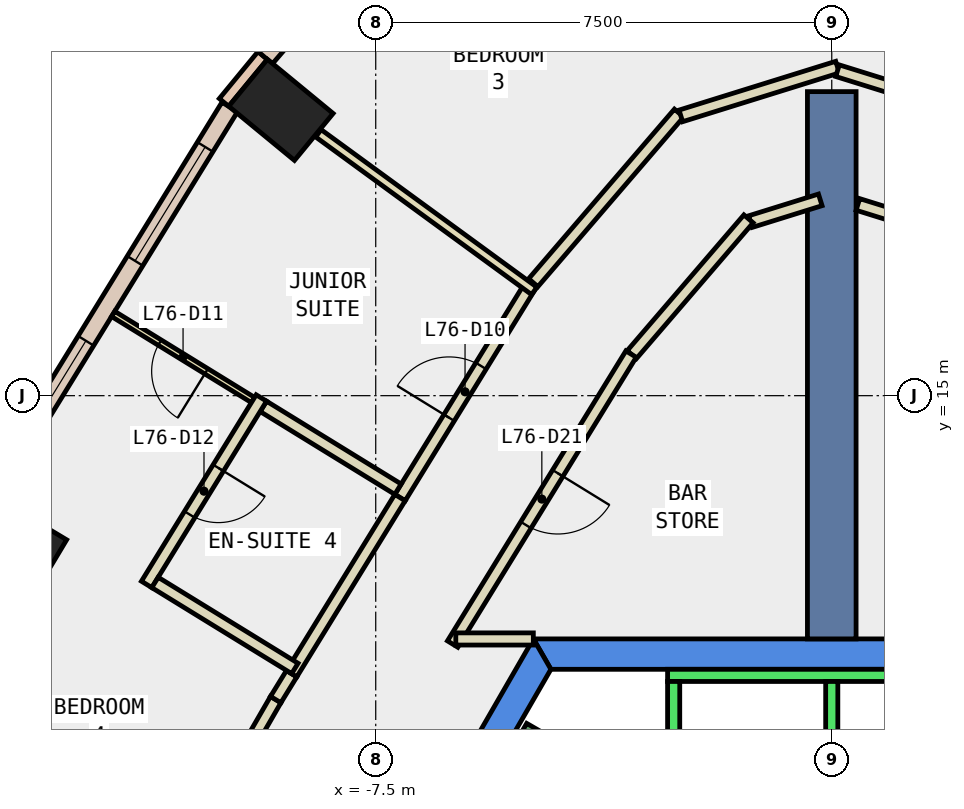
"""IFC4 building model, lengths in metres.
Left out: names, types, materials, properties, quantities, classifications, styles, units other than length and angle.
Written with IfcOpenShell. Run it as: python <this file> out.ifc"""

import sys

from ifc_helpers import new_model, si_unit, direction, frame, frame_2d, origin, origin_2d, place, context, subcontext, project, spatial, polyline, rectangle, outline, extrude, element, fill, save


model = new_model("IFC4")
c1 = context("Model", 3, precision=1e-05, world=origin(), true_north=direction((0.0, 1.0)))
c2 = subcontext(c1, "Body", "Model", "MODEL_VIEW")
j1 = project(units=[si_unit("LENGTHUNIT", "METRE"), si_unit("PLANEANGLEUNIT", "RADIAN")], contexts=[c1])
p1 = place(None, origin())
s1 = spatial("IfcSite", under=j1, at=p1, CompositionType="ELEMENT")
p2 = place(p1, origin())
s2 = spatial("IfcBuilding", under=s1, at=p2, CompositionType="ELEMENT")
p3 = place(p2, frame((0.0, 0.0, 322.4)))
s3 = spatial("IfcBuildingStorey", under=s2, at=p3, CompositionType="ELEMENT", Elevation=322.4)
for number, where, z_axis, x_axis in (
    (1, (-9.059, 19.7, -0.34), (0.0, 0.0, 1.0), (0.636, 0.772, 0.0)),
    (2, (-13.441, 12.561, -0.34), (0.0, 0.0, 1.0), (0.514, 0.858, 0.0)),
):
    element("IfcColumn", number, at=place(p3, frame(where, z_axis=z_axis, x_axis=x_axis)), inside=s3, PredefinedType="COLUMN", context=c2, shape_type="SweptSolid", body=[
        extrude(rectangle(XDim=1.0, YDim=1.4, at=origin_2d()), origin(), (0.0, 0.0, 1.0), 3.34),
    ])
p4 = place(p3, frame((0.0, 0.0, -0.34)))
e3 = element("IfcWall", 3, at=p4, inside=s3, PredefinedType="SHEAR", context=c2, shape_type="SweptSolid", body=[
    extrude(outline(polyline([(4.907, 11.0), (-4.907, 11.0), (-4.619, 10.5), (4.619, 10.5), (4.907, 11.0)])), origin(), (0.0, 0.0, 1.0), 3.34),
])
p5 = place(p3, frame((0.0, 0.0, -0.34)))
e4 = element("IfcWall", 4, at=p5, inside=s3, PredefinedType="SHEAR", context=c2, shape_type="SweptSolid", body=[
    extrude(outline(polyline([(-9.236, 3.502), (-8.803, 3.253), (-4.619, 10.5), (-4.907, 11.0), (-9.236, 3.502)])), origin(), (0.0, 0.0, 1.0), 3.34),
])
p6 = place(p3, frame((0.0, 11.0, -0.34), z_axis=(0.0, 0.0, 1.0), x_axis=(0.0, 1.0, 0.0)))
e5 = element("IfcWall", 5, at=p6, inside=s3, PredefinedType="SHEAR", context=c2, shape_type="SweptSolid", body=[
    extrude(rectangle(XDim=9.0, YDim=0.8, at=frame_2d((4.5, 0.0))), origin(), (0.0, 0.0, 1.0), 3.34),
])
p7 = place(p3, frame((-9.359, 20.594, 0.0), z_axis=(0.0, 0.0, 1.0), x_axis=(-0.635998056672, -0.771690658172, 0.0)))
e6 = element("IfcWall", 6, at=p7, inside=s3, PredefinedType="STANDARD", context=c2, shape_type="SweptSolid", body=[
    extrude(rectangle(XDim=1.0, YDim=0.2, at=frame_2d((0.5, 0.0))), origin(), (0.0, 0.0, 1.0), 3.0),
])
p8 = place(p3, frame((-6.219, 24.156, 0.0), z_axis=(0.0, 0.0, 1.0), x_axis=(-0.651684474108, -0.758490175419, 0.0)))
e7 = element("IfcWall", 7, at=p8, inside=s3, PredefinedType="STANDARD", context=c2, shape_type="SweptSolid", body=[
    extrude(rectangle(XDim=4.748, YDim=0.3, at=frame_2d((2.374, 0.0))), origin(), (0.0, 0.0, 1.0), 3.0),
])
p9 = place(p8, frame((1.674, 0.0, 0.9)))
e8 = element("IfcOpeningElement", 8, at=p9, cuts=e7, PredefinedType="OPENING", context=c2, shape_type="SweptSolid", body=[
    extrude(rectangle(XDim=1.4, YDim=2.0, at=frame_2d((0.7, 1.0))), frame((0.0, 0.16, 0.0), z_axis=(0.0, -1.0, 0.0), x_axis=(1.0, 0.0, 0.0)), (0.0, 0.0, 1.0), 0.32),
])
p10 = place(p3, frame((-9.901, 19.747, 0.0), z_axis=(0.0, 0.0, 1.0), x_axis=(-0.524004608874, -0.851715427757, 0.0)))
e9 = element("IfcWall", 9, at=p10, inside=s3, PredefinedType="STANDARD", context=c2, shape_type="SweptSolid", body=[
    extrude(rectangle(XDim=7.485, YDim=0.3, at=frame_2d((3.742, 0.0))), origin(), (0.0, 0.0, 1.0), 3.0),
])
p11 = place(p10, frame((0.771, 0.0, 0.9)))
e10 = element("IfcOpeningElement", 10, at=p11, cuts=e9, PredefinedType="OPENING", context=c2, shape_type="SweptSolid", body=[
    extrude(rectangle(XDim=2.2, YDim=2.0, at=frame_2d((1.1, 1.0))), frame((0.0, 0.16, 0.0), z_axis=(0.0, -1.0, 0.0), x_axis=(1.0, 0.0, 0.0)), (0.0, 0.0, 1.0), 0.32),
])
p12 = place(p10, frame((4.514, 0.0, 0.9)))
e11 = element("IfcOpeningElement", 11, at=p12, cuts=e9, PredefinedType="OPENING", context=c2, shape_type="SweptSolid", body=[
    extrude(rectangle(XDim=2.2, YDim=2.0, at=frame_2d((1.1, 1.0))), frame((0.0, 0.16, 0.0), z_axis=(0.0, -1.0, 0.0), x_axis=(1.0, 0.0, 0.0)), (0.0, 0.0, 1.0), 0.32),
])
p13 = place(p3, frame((1.339, 17.862, 0.0), z_axis=(0.0, 0.0, 1.0), x_axis=(-0.954826063502, 0.297165254457, 0.0)))
e12 = element("IfcWall", 12, at=p13, inside=s3, PredefinedType="PARTITIONING", context=c2, shape_type="SweptSolid", body=[
    extrude(rectangle(XDim=0.952, YDim=0.2, at=frame_2d((0.476, 0.0))), origin(), (0.0, 0.0, 1.0), 3.0),
])
p14 = place(p3, frame((-0.189, 18.22, 0.0), z_axis=(0.0, 0.0, 1.0), x_axis=(-0.954836332451, -0.297132257137, 0.0)))
e13 = element("IfcWall", 13, at=p14, inside=s3, PredefinedType="PARTITIONING", context=c2, shape_type="SweptSolid", body=[
    extrude(rectangle(XDim=1.205, YDim=0.2, at=frame_2d((0.602, 0.0))), origin(), (0.0, 0.0, 1.0), 3.0),
])
p15 = place(p3, frame((-1.369, 17.908, 0.0), z_axis=(0.0, 0.0, 1.0), x_axis=(-0.651848676423, -0.758349064116, 0.0)))
e14 = element("IfcWall", 14, at=p15, inside=s3, PredefinedType="PARTITIONING", context=c2, shape_type="SweptSolid", body=[
    extrude(rectangle(XDim=2.946, YDim=0.2, at=frame_2d((1.473, 0.0))), origin(), (0.0, 0.0, 1.0), 3.0),
])
p16 = place(p3, frame((-3.301, 15.684, 0.0), z_axis=(0.0, 0.0, 1.0), x_axis=(-0.524004979532, -0.851715199715, 0.0)))
e15 = element("IfcWall", 15, at=p16, inside=s3, PredefinedType="PARTITIONING", context=c2, shape_type="SweptSolid", body=[
    extrude(rectangle(XDim=5.599, YDim=0.2, at=frame_2d((2.8, 0.0))), origin(), (0.0, 0.0, 1.0), 3.0),
])
p17 = place(p16, frame((2.3, 0.0, 0.0)))
e16 = element("IfcOpeningElement", 16, at=p17, cuts=e15, PredefinedType="OPENING", context=c2, shape_type="SweptSolid", body=[
    extrude(rectangle(XDim=1.0, YDim=2.1, at=frame_2d((0.5, 1.05))), frame((0.0, 0.11, 0.0), z_axis=(0.0, -1.0, 0.0), x_axis=(1.0, 0.0, 0.0)), (0.0, 0.0, 1.0), 0.22),
])
p18 = place(p3, frame((-6.183, 10.999, 0.0), z_axis=(0.0, 0.0, 1.0), x_axis=(1.0, 0.0, 0.0)))
e17 = element("IfcWall", 17, at=p18, inside=s3, PredefinedType="PARTITIONING", context=c2, shape_type="SweptSolid", body=[
    extrude(rectangle(XDim=1.275, YDim=0.2, at=frame_2d((0.638, 0.0))), origin(), (0.0, 0.0, 1.0), 3.0),
])
p19 = place(p3, frame((-4.909, 16.858, 0.0), z_axis=(0.0, 0.0, 1.0), x_axis=(0.651785835936, 0.758403074937, 0.0)))
e18 = element("IfcWall", 18, at=p19, inside=s3, PredefinedType="PARTITIONING", context=c2, shape_type="SweptSolid", body=[
    extrude(rectangle(XDim=3.677, YDim=0.2, at=frame_2d((1.839, 0.0))), origin(), (0.0, 0.0, 1.0), 3.0),
])
p20 = place(p3, frame((-2.482, 19.601, 0.0), z_axis=(0.0, 0.0, 1.0), x_axis=(0.95482540871, 0.297167358372, 0.0)))
e19 = element("IfcWall", 19, at=p20, inside=s3, PredefinedType="PARTITIONING", context=c2, shape_type="SweptSolid", body=[
    extrude(rectangle(XDim=2.699, YDim=0.2, at=frame_2d((1.349, 0.0))), origin(), (0.0, 0.0, 1.0), 3.0),
])
p21 = place(p3, frame((0.095, 20.344, 0.0), z_axis=(0.0, 0.0, 1.0), x_axis=(0.954837867825, -0.297127323158, 0.0)))
e20 = element("IfcWall", 20, at=p21, inside=s3, PredefinedType="PARTITIONING", context=c2, shape_type="SweptSolid", body=[
    extrude(rectangle(XDim=2.605, YDim=0.2, at=frame_2d((1.302, 0.0))), origin(), (0.0, 0.0, 1.0), 3.0),
])
p22 = place(p3, frame((-7.101, 13.324, 0.0), z_axis=(0.0, 0.0, 1.0), x_axis=(0.52395735307, 0.851744499344, 0.0)))
e21 = element("IfcWall", 21, at=p22, inside=s3, PredefinedType="PARTITIONING", context=c2, shape_type="SweptSolid", body=[
    extrude(rectangle(XDim=4.084, YDim=0.2, at=frame_2d((2.042, 0.0))), origin(), (0.0, 0.0, 1.0), 3.0),
])
p23 = place(p22, frame((1.542, 0.0, 0.0)))
e22 = element("IfcOpeningElement", 22, at=p23, cuts=e21, PredefinedType="OPENING", context=c2, shape_type="SweptSolid", body=[
    extrude(rectangle(XDim=1.0, YDim=2.1, at=frame_2d((0.5, 1.05))), frame((0.0, 0.11, 0.0), z_axis=(0.0, -1.0, 0.0), x_axis=(1.0, 0.0, 0.0)), (0.0, 0.0, 1.0), 0.22),
])
p24 = place(p3, frame((-11.153, 6.525, 0.0), z_axis=(0.0, 0.0, 1.0), x_axis=(0.500108414701, 0.865962801479, 0.0)))
e23 = element("IfcWall", 23, at=p24, inside=s3, PredefinedType="PARTITIONING", context=c2, shape_type="SweptSolid", body=[
    extrude(rectangle(XDim=4.015, YDim=0.2, at=frame_2d((2.008, 0.0))), origin(), (0.0, 0.0, 1.0), 3.0),
])
p25 = place(p3, frame((-9.145, 10.002, 0.0), z_axis=(0.0, 0.0, 1.0), x_axis=(0.523797791684, 0.851842634192, 0.0)))
e24 = element("IfcWall", 24, at=p25, inside=s3, PredefinedType="PARTITIONING", context=c2, shape_type="SweptSolid", body=[
    extrude(rectangle(XDim=0.5, YDim=0.2, at=frame_2d((0.25, 0.0))), origin(), (0.0, 0.0, 1.0), 3.0),
])
p26 = place(p3, frame((-8.883, 10.428, 0.0), z_axis=(0.0, 0.0, 1.0), x_axis=(0.524061371587, 0.851680502777, 0.0)))
e25 = element("IfcWall", 25, at=p26, inside=s3, PredefinedType="PARTITIONING", context=c2, shape_type="SweptSolid", body=[
    extrude(rectangle(XDim=3.4, YDim=0.2, at=frame_2d((1.7, 0.0))), origin(), (0.0, 0.0, 1.0), 3.0),
])
p27 = place(p3, frame((-4.893, 16.723, 0.0), z_axis=(0.0, 0.0, 1.0), x_axis=(-0.807632235509, 0.589686503294, 0.0)))
e26 = element("IfcWall", 26, at=p27, inside=s3, PredefinedType="PARTITIONING", context=c2, shape_type="SweptSolid", body=[
    extrude(rectangle(XDim=4.396, YDim=0.15, at=frame_2d((2.198, 0.0))), origin(), (0.0, 0.0, 1.0), 3.0),
])
p28 = place(p3, frame((-9.519, 14.929, 0.0), z_axis=(0.0, 0.0, 1.0), x_axis=(-0.851621054013, 0.524157972715, 0.0)))
e27 = element("IfcWall", 27, at=p28, inside=s3, PredefinedType="PARTITIONING", context=c2, shape_type="SweptSolid", body=[
    extrude(rectangle(XDim=2.7, YDim=0.1, at=frame_2d((1.35, 0.0))), origin(), (0.0, 0.0, 1.0), 3.0),
])
p29 = place(p28, frame((0.9, 0.0, 0.0)))
e28 = element("IfcOpeningElement", 28, at=p29, cuts=e27, PredefinedType="OPENING", context=c2, shape_type="SweptSolid", body=[
    extrude(rectangle(XDim=0.9, YDim=2.1, at=frame_2d((0.45, 1.05))), frame((0.0, 0.06, 0.0), z_axis=(0.0, -1.0, 0.0), x_axis=(1.0, 0.0, 0.0)), (0.0, 0.0, 1.0), 0.12),
])
p30 = place(p3, frame((-7.134, 13.462, 0.0), z_axis=(0.0, 0.0, 1.0), x_axis=(-0.851713135301, 0.524008335007, 0.0)))
e29 = element("IfcWall", 29, at=p30, inside=s3, PredefinedType="PARTITIONING", context=c2, shape_type="SweptSolid", body=[
    extrude(rectangle(XDim=2.599, YDim=0.2, at=frame_2d((1.3, 0.0))), origin(), (0.0, 0.0, 1.0), 3.0),
])
p31 = place(p3, frame((-9.381, 14.962, 0.0), z_axis=(0.0, 0.0, 1.0), x_axis=(-0.524146612914, -0.851628045669, 0.0)))
e30 = element("IfcWall", 30, at=p31, inside=s3, PredefinedType="PARTITIONING", context=c2, shape_type="SweptSolid", body=[
    extrude(rectangle(XDim=3.6, YDim=0.2, at=frame_2d((1.8, 0.0))), origin(), (0.0, 0.0, 1.0), 3.0),
])
p32 = place(p31, frame((1.35, 0.0, 0.0)))
e31 = element("IfcOpeningElement", 31, at=p32, cuts=e30, PredefinedType="OPENING", context=c2, shape_type="SweptSolid", body=[
    extrude(rectangle(XDim=0.9, YDim=2.1, at=frame_2d((0.45, 1.05))), frame((0.0, 0.11, 0.0), z_axis=(0.0, -1.0, 0.0), x_axis=(1.0, 0.0, 0.0)), (0.0, 0.0, 1.0), 0.22),
])
p33 = place(p3, frame((-11.13, 11.928, 0.0), z_axis=(0.0, 0.0, 1.0), x_axis=(0.851856970107, -0.523774476737, 0.0)))
e32 = element("IfcWall", 32, at=p33, inside=s3, PredefinedType="PARTITIONING", context=c2, shape_type="SweptSolid", body=[
    extrude(rectangle(XDim=2.7, YDim=0.2, at=frame_2d((1.35, 0.0))), origin(), (0.0, 0.0, 1.0), 3.0),
])
p34 = place(p3, frame((2.7, 10.4, 0.0), z_axis=(0.0, 0.0, 1.0), x_axis=(-1.0, 0.0, 0.0)))
e33 = element("IfcWall", 33, at=p34, inside=s3, PredefinedType="STANDARD", context=c2, shape_type="SweptSolid", body=[
    extrude(rectangle(XDim=5.4, YDim=0.2, at=frame_2d((2.7, 0.0))), origin(), (0.0, 0.0, 1.0), 3.0),
])
for number, where, z_axis, x_axis in (
    (34, (0.0, 7.9, 0.0), (0.0, 0.0, 1.0), (0.0, 1.0, 0.0)),
    (35, (-2.6, 7.9, 0.0), (0.0, 0.0, 1.0), (0.0, 1.0, 0.0)),
):
    element("IfcWall", number, at=place(p3, frame(where, z_axis=z_axis, x_axis=x_axis)), inside=s3, PredefinedType="STANDARD", context=c2, shape_type="SweptSolid", body=[
        extrude(rectangle(XDim=2.4, YDim=0.2, at=frame_2d((1.2, 0.0))), origin(), (0.0, 0.0, 1.0), 3.0),
    ])
p35 = place(p3, frame((-1.256, 7.324, 0.0), z_axis=(0.0, 0.0, 1.0), x_axis=(-0.866046073146, 0.499964197906, 0.0)))
e36 = element("IfcWall", 36, at=p35, inside=s3, PredefinedType="STANDARD", context=c2, shape_type="SweptSolid", body=[
    extrude(rectangle(XDim=4.4, YDim=0.2, at=frame_2d((2.2, 0.0))), origin(), (0.0, 0.0, 1.0), 3.0),
])
p36 = place(p35, frame((2.4, 0.0, 0.0)))
e37 = element("IfcOpeningElement", 37, at=p36, cuts=e36, PredefinedType="OPENING", context=c2, shape_type="SweptSolid", body=[
    extrude(rectangle(XDim=1.1, YDim=2.2, at=frame_2d((0.55, 1.1))), frame((0.0, 0.11, 0.0), z_axis=(0.0, -1.0, 0.0), x_axis=(1.0, 0.0, 0.0)), (0.0, 0.0, 1.0), 0.22),
])
p37 = place(p11, origin())
e38 = element("IfcWindow", 38, at=p37, inside=s3, PartitioningType="SINGLE_PANEL", PredefinedType="WINDOW", context=c2, shape_type="SweptSolid", body=[
    extrude(rectangle(XDim=2.2, YDim=2.0, at=frame_2d((1.1, 1.0))), frame((0.0, 0.03, 0.0), z_axis=(0.0, -1.0, 0.0), x_axis=(1.0, 0.0, 0.0)), (0.0, 0.0, 1.0), 0.06),
])
fill(e10, e38)
p38 = place(p12, origin())
e39 = element("IfcWindow", 39, at=p38, inside=s3, PartitioningType="SINGLE_PANEL", PredefinedType="WINDOW", context=c2, shape_type="SweptSolid", body=[
    extrude(rectangle(XDim=2.2, YDim=2.0, at=frame_2d((1.1, 1.0))), frame((0.0, 0.03, 0.0), z_axis=(0.0, -1.0, 0.0), x_axis=(1.0, 0.0, 0.0)), (0.0, 0.0, 1.0), 0.06),
])
fill(e11, e39)
p39 = place(p23, origin())
e40 = element("IfcDoor", 40, at=p39, inside=s3, OperationType="SINGLE_SWING_LEFT", PredefinedType="DOOR", context=c2, shape_type="SweptSolid", body=[
    extrude(rectangle(XDim=1.0, YDim=2.1, at=frame_2d((0.5, 1.05))), frame((0.0, 0.025, 0.0), z_axis=(0.0, -1.0, 0.0), x_axis=(1.0, 0.0, 0.0)), (0.0, 0.0, 1.0), 0.05),
])
fill(e22, e40)
p40 = place(p29, origin())
e41 = element("IfcDoor", 41, at=p40, inside=s3, OperationType="SINGLE_SWING_RIGHT", PredefinedType="DOOR", context=c2, shape_type="SweptSolid", body=[
    extrude(rectangle(XDim=0.9, YDim=2.1, at=frame_2d((0.45, 1.05))), frame((0.0, 0.025, 0.0), z_axis=(0.0, -1.0, 0.0), x_axis=(1.0, 0.0, 0.0)), (0.0, 0.0, 1.0), 0.05),
])
fill(e28, e41)
p41 = place(p32, origin())
e42 = element("IfcDoor", 42, at=p41, inside=s3, OperationType="SINGLE_SWING_RIGHT", PredefinedType="DOOR", context=c2, shape_type="SweptSolid", body=[
    extrude(rectangle(XDim=0.9, YDim=2.1, at=frame_2d((0.45, 1.05))), frame((0.0, 0.025, 0.0), z_axis=(0.0, -1.0, 0.0), x_axis=(1.0, 0.0, 0.0)), (0.0, 0.0, 1.0), 0.05),
])
fill(e31, e42)
p42 = place(p17, origin())
e43 = element("IfcDoor", 43, at=p42, inside=s3, OperationType="SINGLE_SWING_LEFT", PredefinedType="DOOR", context=c2, shape_type="SweptSolid", body=[
    extrude(rectangle(XDim=1.0, YDim=2.1, at=frame_2d((0.5, 1.05))), frame((0.0, 0.025, 0.0), z_axis=(0.0, -1.0, 0.0), x_axis=(1.0, 0.0, 0.0)), (0.0, 0.0, 1.0), 0.05),
])
fill(e16, e43)
save(model, sys.argv[1])
